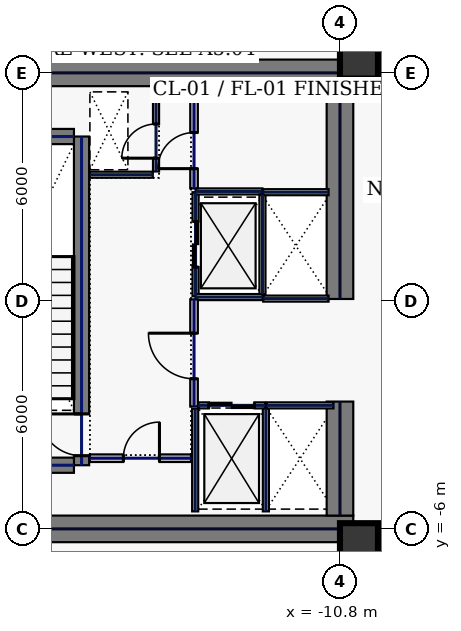
"""IFC4 building model, lengths in metres.
Left out: names, types, materials, properties, quantities, classifications, styles, units other than length and angle.
Written with IfcOpenShell. Run it as: python <this file> out.ifc"""

import sys

from ifc_helpers import new_model, si_unit, direction, frame, frame_2d, origin, origin_2d, place, context, subcontext, project, spatial, rectangle, hollow_rectangle, extrude, element, fill, save


model = new_model("IFC4")
c1 = context("Model", 3, precision=1e-05, world=origin(), true_north=direction((0.0, 1.0)))
c2 = subcontext(c1, "Body", "Model", "MODEL_VIEW")
j1 = project(units=[si_unit("LENGTHUNIT", "METRE"), si_unit("PLANEANGLEUNIT", "RADIAN")], contexts=[c1])
p1 = place(None, origin())
s1 = spatial("IfcSite", under=j1, at=p1, CompositionType="ELEMENT")
p2 = place(p1, origin())
s2 = spatial("IfcBuilding", under=s1, at=p2, CompositionType="ELEMENT")
p3 = place(p2, frame((0.0, 0.0, 121.4)))
s3 = spatial("IfcBuildingStorey", under=s2, at=p3, CompositionType="ELEMENT", Elevation=121.4)
for number, where, z_axis, x_axis in (
    (1, (-22.0, 6.0, 0.0), (0.0, 0.0, 1.0), (1.0, 0.0, 0.0)),
    (2, (-22.0, -6.0, 0.0), (0.0, 0.0, 1.0), (1.0, 0.0, 0.0)),
):
    element("IfcWall", number, at=place(p3, frame(where, z_axis=z_axis, x_axis=x_axis)), inside=s3, PredefinedType="SHEAR", context=c2, shape_type="SweptSolid", body=[
        extrude(rectangle(XDim=11.55, YDim=0.7, at=frame_2d((5.775, 0.0))), origin(), (0.0, 0.0, 1.0), 3.74),
    ])
p4 = place(p3, frame((-10.8, -5.65, 0.0), z_axis=(0.0, 0.0, 1.0), x_axis=(0.0, 1.0, 0.0)))
e3 = element("IfcWall", 3, at=p4, inside=s3, PredefinedType="SHEAR", context=c2, shape_type="SweptSolid", body=[
    extrude(rectangle(XDim=3.0, YDim=0.7, at=frame_2d((1.5, 0.0))), origin(), (0.0, 0.0, 1.0), 3.74),
])
p5 = place(p3, frame((-10.8, 0.05, 0.0), z_axis=(0.0, 0.0, 1.0), x_axis=(0.0, 1.0, 0.0)))
e4 = element("IfcWall", 4, at=p5, inside=s3, PredefinedType="SHEAR", context=c2, shape_type="SweptSolid", body=[
    extrude(rectangle(XDim=5.6, YDim=0.7, at=frame_2d((2.8, 0.0))), origin(), (0.0, 0.0, 1.0), 3.74),
])
p6 = place(p3, frame((-17.6, -4.325, 0.0), z_axis=(0.0, 0.0, 1.0), x_axis=(0.0, 1.0, 0.0)))
e5 = element("IfcWall", 5, at=p6, inside=s3, PredefinedType="SHEAR", context=c2, shape_type="SweptSolid", body=[
    extrude(rectangle(XDim=8.65, YDim=0.4, at=frame_2d((4.325, 0.0))), origin(), (0.0, 0.0, 1.0), 3.74),
])
p7 = place(p6, frame((0.25, 0.0, 0.0)))
e6 = element("IfcOpeningElement", 6, at=p7, cuts=e5, PredefinedType="OPENING", context=c2, shape_type="SweptSolid", body=[
    extrude(rectangle(XDim=1.1, YDim=2.2, at=frame_2d((0.55, 1.1))), frame((0.0, 0.21, 0.0), z_axis=(0.0, -1.0, 0.0), x_axis=(1.0, 0.0, 0.0)), (0.0, 0.0, 1.0), 0.42),
])
for number, where, z_axis, x_axis in (
    (7, (-21.2, -4.325, 0.0), (0.0, 0.0, 1.0), (1.0, 0.0, 0.0)),
    (8, (-21.2, 4.325, 0.0), (0.0, 0.0, 1.0), (1.0, 0.0, 0.0)),
):
    element("IfcWall", number, at=place(p3, frame(where, z_axis=z_axis, x_axis=x_axis)), inside=s3, PredefinedType="SHEAR", context=c2, shape_type="SweptSolid", body=[
        extrude(rectangle(XDim=3.4, YDim=0.4, at=frame_2d((1.7, 0.0))), origin(), (0.0, 0.0, 1.0), 3.74),
    ])
for number, where, z_axis, x_axis in (
    (9, (-10.3, -6.35, 0.0), (0.0, 0.0, 1.0), (1.0, 0.0, 0.0)),
    (10, (-10.3, 6.35, 0.0), (0.0, 0.0, 1.0), (1.0, 0.0, 0.0)),
):
    element("IfcColumn", number, at=place(p3, frame(where, z_axis=z_axis, x_axis=x_axis)), inside=s3, PredefinedType="COLUMN", context=c2, shape_type="SweptSolid", body=[
        extrude(hollow_rectangle(XDim=1.0, YDim=1.0, WallThickness=0.045, at=origin_2d()), origin(), (0.0, 0.0, 1.0), 3.74),
    ])
p8 = place(p3, frame((-14.6, 0.12, 0.0), z_axis=(0.0, 0.0, 1.0), x_axis=(0.0, 1.0, 0.0)))
e11 = element("IfcWall", 11, at=p8, inside=s3, PredefinedType="PARTITIONING", context=c2, shape_type="SweptSolid", body=[
    extrude(rectangle(XDim=2.74, YDim=0.16, at=frame_2d((1.37, 0.0))), origin(), (0.0, 0.0, 1.0), 3.74),
])
p9 = place(p8, frame((0.77, 0.0, 0.0)))
e12 = element("IfcOpeningElement", 12, at=p9, cuts=e11, PredefinedType="OPENING", context=c2, shape_type="SweptSolid", body=[
    extrude(rectangle(XDim=1.2, YDim=2.2, at=frame_2d((0.6, 1.1))), frame((0.0, 0.09, 0.0), z_axis=(0.0, -1.0, 0.0), x_axis=(1.0, 0.0, 0.0)), (0.0, 0.0, 1.0), 0.18),
])
for number, where, z_axis, x_axis in (
    (13, (-14.6, 0.1, 0.0), (0.0, 0.0, 1.0), (1.0, 0.0, 0.0)),
    (14, (-14.6, 2.88, 0.0), (0.0, 0.0, 1.0), (1.0, 0.0, 0.0)),
):
    element("IfcWall", number, at=place(p3, frame(where, z_axis=z_axis, x_axis=x_axis)), inside=s3, PredefinedType="PARTITIONING", context=c2, shape_type="SweptSolid", body=[
        extrude(rectangle(XDim=1.76, YDim=0.16, at=frame_2d((0.88, 0.0))), origin(), (0.0, 0.0, 1.0), 3.74),
    ])
p10 = place(p3, frame((-12.84, 0.18, 0.0), z_axis=(0.0, 0.0, 1.0), x_axis=(0.0, 1.0, 0.0)))
e15 = element("IfcWall", 15, at=p10, inside=s3, PredefinedType="PARTITIONING", context=c2, shape_type="SweptSolid", body=[
    extrude(rectangle(XDim=2.62, YDim=0.16, at=frame_2d((1.31, 0.0))), origin(), (0.0, 0.0, 1.0), 3.74),
])
p11 = place(p3, frame((-14.53, -2.75, 0.0), z_axis=(0.0, 0.0, 1.0), x_axis=(1.0, 0.0, 0.0)))
e16 = element("IfcWall", 16, at=p11, inside=s3, PredefinedType="PARTITIONING", context=c2, shape_type="SweptSolid", body=[
    extrude(rectangle(XDim=1.76, YDim=0.16, at=frame_2d((0.88, 0.0))), origin(), (0.0, 0.0, 1.0), 3.74),
])
p12 = place(p11, frame((0.28, 0.0, 0.0)))
e17 = element("IfcOpeningElement", 17, at=p12, cuts=e16, PredefinedType="OPENING", context=c2, shape_type="SweptSolid", body=[
    extrude(rectangle(XDim=1.2, YDim=2.2, at=frame_2d((0.6, 1.1))), frame((0.0, 0.09, 0.0), z_axis=(0.0, -1.0, 0.0), x_axis=(1.0, 0.0, 0.0)), (0.0, 0.0, 1.0), 0.18),
])
for number, where, z_axis, x_axis in (
    (18, (-12.75, -5.54, 0.0), (0.0, 0.0, 1.0), (0.0, 1.0, 0.0)),
    (19, (-14.61, -5.54, 0.0), (0.0, 0.0, 1.0), (0.0, 1.0, 0.0)),
):
    element("IfcWall", number, at=place(p3, frame(where, z_axis=z_axis, x_axis=x_axis)), inside=s3, PredefinedType="PARTITIONING", context=c2, shape_type="SweptSolid", body=[
        extrude(rectangle(XDim=2.7, YDim=0.16, at=frame_2d((1.35, 0.0))), origin(), (0.0, 0.0, 1.0), 3.74),
    ])
p13 = place(p3, frame((-12.73, -2.75, 0.0), z_axis=(0.0, 0.0, 1.0), x_axis=(1.0, 0.0, 0.0)))
e20 = element("IfcWall", 20, at=p13, inside=s3, PredefinedType="PARTITIONING", context=c2, shape_type="SweptSolid", body=[
    extrude(rectangle(XDim=1.76, YDim=0.16, at=frame_2d((0.88, 0.0))), origin(), (0.0, 0.0, 1.0), 3.74),
])
for number, where, z_axis, x_axis in (
    (21, (-12.82, 0.06, 0.0), (0.0, 0.0, 1.0), (1.0, 0.0, 0.0)),
    (22, (-12.82, 2.86, 0.0), (0.0, 0.0, 1.0), (1.0, 0.0, 0.0)),
):
    element("IfcWall", number, at=place(p3, frame(where, z_axis=z_axis, x_axis=x_axis)), inside=s3, PredefinedType="PARTITIONING", context=c2, shape_type="SweptSolid", body=[
        extrude(rectangle(XDim=1.72, YDim=0.16, at=frame_2d((0.86, 0.0))), origin(), (0.0, 0.0, 1.0), 3.74),
    ])
p14 = place(p3, frame((-15.64, 3.405, 0.0), z_axis=(0.0, 0.0, 1.0), x_axis=(0.0, 1.0, 0.0)))
e23 = element("IfcWall", 23, at=p14, inside=s3, PredefinedType="PARTITIONING", context=c2, shape_type="SweptSolid", body=[
    extrude(rectangle(XDim=2.155, YDim=0.16, at=frame_2d((1.078, 0.0))), origin(), (0.0, 0.0, 1.0), 3.74),
])
p15 = place(p14, frame((0.35, 0.0, 0.0)))
e24 = element("IfcOpeningElement", 24, at=p15, cuts=e23, PredefinedType="OPENING", context=c2, shape_type="SweptSolid", body=[
    extrude(rectangle(XDim=0.9, YDim=2.2, at=frame_2d((0.45, 1.1))), frame((0.0, 0.09, 0.0), z_axis=(0.0, -1.0, 0.0), x_axis=(1.0, 0.0, 0.0)), (0.0, 0.0, 1.0), 0.18),
])
p16 = place(p3, frame((-17.38, 3.32, 0.0), z_axis=(0.0, 0.0, 1.0), x_axis=(1.0, 0.0, 0.0)))
e25 = element("IfcWall", 25, at=p16, inside=s3, PredefinedType="PARTITIONING", context=c2, shape_type="SweptSolid", body=[
    extrude(rectangle(XDim=1.655, YDim=0.16, at=frame_2d((0.827, 0.0))), origin(), (0.0, 0.0, 1.0), 3.74),
])
p17 = place(p3, frame((-17.38, -4.14, 0.0), z_axis=(0.0, 0.0, 1.0), x_axis=(1.0, 0.0, 0.0)))
e26 = element("IfcWall", 26, at=p17, inside=s3, PredefinedType="SOLIDWALL", context=c2, shape_type="SweptSolid", body=[
    extrude(rectangle(XDim=2.66, YDim=0.2, at=frame_2d((1.33, 0.0))), origin(), (0.0, 0.0, 1.0), 3.74),
])
p18 = place(p17, frame((0.88, 0.0, 0.0)))
e27 = element("IfcOpeningElement", 27, at=p18, cuts=e26, PredefinedType="OPENING", context=c2, shape_type="SweptSolid", body=[
    extrude(rectangle(XDim=0.95, YDim=2.2, at=frame_2d((0.475, 1.1))), frame((0.0, 0.11, 0.0), z_axis=(0.0, -1.0, 0.0), x_axis=(1.0, 0.0, 0.0)), (0.0, 0.0, 1.0), 0.22),
])
p19 = place(p3, frame((-14.64, 2.96, 0.0), z_axis=(0.0, 0.0, 1.0), x_axis=(0.0, 1.0, 0.0)))
e28 = element("IfcWall", 28, at=p19, inside=s3, PredefinedType="SOLIDWALL", context=c2, shape_type="SweptSolid", body=[
    extrude(rectangle(XDim=2.6, YDim=0.2, at=frame_2d((1.3, 0.0))), origin(), (0.0, 0.0, 1.0), 3.74),
])
p20 = place(p19, frame((0.52, 0.0, 0.0)))
e29 = element("IfcOpeningElement", 29, at=p20, cuts=e28, PredefinedType="OPENING", context=c2, shape_type="SweptSolid", body=[
    extrude(rectangle(XDim=0.95, YDim=2.2, at=frame_2d((0.475, 1.1))), frame((0.0, 0.11, 0.0), z_axis=(0.0, -1.0, 0.0), x_axis=(1.0, 0.0, 0.0)), (0.0, 0.0, 1.0), 0.22),
])
p21 = place(p3, frame((-14.64, -2.78, 0.0), z_axis=(0.0, 0.0, 1.0), x_axis=(0.0, 1.0, 0.0)))
e30 = element("IfcWall", 30, at=p21, inside=s3, PredefinedType="SOLIDWALL", context=c2, shape_type="SweptSolid", body=[
    extrude(rectangle(XDim=2.82, YDim=0.2, at=frame_2d((1.41, 0.0))), origin(), (0.0, 0.0, 1.0), 3.74),
])
p22 = place(p21, frame((0.73, 0.0, 0.0)))
e31 = element("IfcOpeningElement", 31, at=p22, cuts=e30, PredefinedType="OPENING", context=c2, shape_type="SweptSolid", body=[
    extrude(rectangle(XDim=1.2, YDim=2.2, at=frame_2d((0.6, 1.1))), frame((0.0, 0.11, 0.0), z_axis=(0.0, -1.0, 0.0), x_axis=(1.0, 0.0, 0.0)), (0.0, 0.0, 1.0), 0.22),
])
p23 = place(p3, frame((-10.58, -6.985, 0.0), z_axis=(0.0, 0.0, 1.0), x_axis=(0.0, 1.0, 0.0)))
e32 = element("IfcWall", 32, at=p23, inside=s3, PredefinedType="PARTITIONING", context=c2, shape_type="SweptSolid", body=[
    extrude(rectangle(XDim=0.565, YDim=0.16, at=frame_2d((0.283, 0.0))), origin(), (0.0, 0.0, 1.0), 3.74),
])
p24 = place(p3, frame((-10.58, 6.42, 0.0), z_axis=(0.0, 0.0, 1.0), x_axis=(0.0, 1.0, 0.0)))
e33 = element("IfcWall", 33, at=p24, inside=s3, PredefinedType="PARTITIONING", context=c2, shape_type="SweptSolid", body=[
    extrude(rectangle(XDim=0.765, YDim=0.16, at=frame_2d((0.383, 0.0))), origin(), (0.0, 0.0, 1.0), 3.74),
])
p25 = place(p7, origin())
e34 = element("IfcDoor", 34, at=p25, inside=s3, OperationType="SINGLE_SWING_RIGHT", PredefinedType="DOOR", context=c2, shape_type="SweptSolid", body=[
    extrude(rectangle(XDim=1.1, YDim=2.2, at=frame_2d((0.55, 1.1))), frame((0.0, 0.025, 0.0), z_axis=(0.0, -1.0, 0.0), x_axis=(1.0, 0.0, 0.0)), (0.0, 0.0, 1.0), 0.05),
])
fill(e6, e34)
p26 = place(p9, origin())
e35 = element("IfcDoor", 35, at=p26, inside=s3, OperationType="SLIDING_TO_LEFT", PredefinedType="DOOR", context=c2, shape_type="SweptSolid", body=[
    extrude(rectangle(XDim=1.2, YDim=2.2, at=frame_2d((0.6, 1.1))), frame((0.0, 0.025, 0.0), z_axis=(0.0, -1.0, 0.0), x_axis=(1.0, 0.0, 0.0)), (0.0, 0.0, 1.0), 0.05),
])
fill(e12, e35)
p27 = place(p12, origin())
e36 = element("IfcDoor", 36, at=p27, inside=s3, OperationType="SLIDING_TO_LEFT", PredefinedType="DOOR", context=c2, shape_type="SweptSolid", body=[
    extrude(rectangle(XDim=1.2, YDim=2.2, at=frame_2d((0.6, 1.1))), frame((0.0, 0.025, 0.0), z_axis=(0.0, -1.0, 0.0), x_axis=(1.0, 0.0, 0.0)), (0.0, 0.0, 1.0), 0.05),
])
fill(e17, e36)
p28 = place(p15, origin())
e37 = element("IfcDoor", 37, at=p28, inside=s3, OperationType="SINGLE_SWING_LEFT", PredefinedType="DOOR", context=c2, shape_type="SweptSolid", body=[
    extrude(rectangle(XDim=0.9, YDim=2.2, at=frame_2d((0.45, 1.1))), frame((0.0, 0.025, 0.0), z_axis=(0.0, -1.0, 0.0), x_axis=(1.0, 0.0, 0.0)), (0.0, 0.0, 1.0), 0.05),
])
fill(e24, e37)
p29 = place(p18, origin())
e38 = element("IfcDoor", 38, at=p29, inside=s3, OperationType="SINGLE_SWING_RIGHT", PredefinedType="DOOR", context=c2, shape_type="SweptSolid", body=[
    extrude(rectangle(XDim=0.95, YDim=2.2, at=frame_2d((0.475, 1.1))), frame((0.0, 0.025, 0.0), z_axis=(0.0, -1.0, 0.0), x_axis=(1.0, 0.0, 0.0)), (0.0, 0.0, 1.0), 0.05),
])
fill(e27, e38)
p30 = place(p20, origin())
e39 = element("IfcDoor", 39, at=p30, inside=s3, OperationType="SINGLE_SWING_LEFT", PredefinedType="DOOR", context=c2, shape_type="SweptSolid", body=[
    extrude(rectangle(XDim=0.95, YDim=2.2, at=frame_2d((0.475, 1.1))), frame((0.0, 0.025, 0.0), z_axis=(0.0, -1.0, 0.0), x_axis=(1.0, 0.0, 0.0)), (0.0, 0.0, 1.0), 0.05),
])
fill(e29, e39)
p31 = place(p22, origin())
e40 = element("IfcDoor", 40, at=p31, inside=s3, OperationType="SINGLE_SWING_RIGHT", PredefinedType="DOOR", context=c2, shape_type="SweptSolid", body=[
    extrude(rectangle(XDim=1.2, YDim=2.2, at=frame_2d((0.6, 1.1))), frame((0.0, 0.025, 0.0), z_axis=(0.0, -1.0, 0.0), x_axis=(1.0, 0.0, 0.0)), (0.0, 0.0, 1.0), 0.05),
])
fill(e31, e40)
save(model, sys.argv[1])
